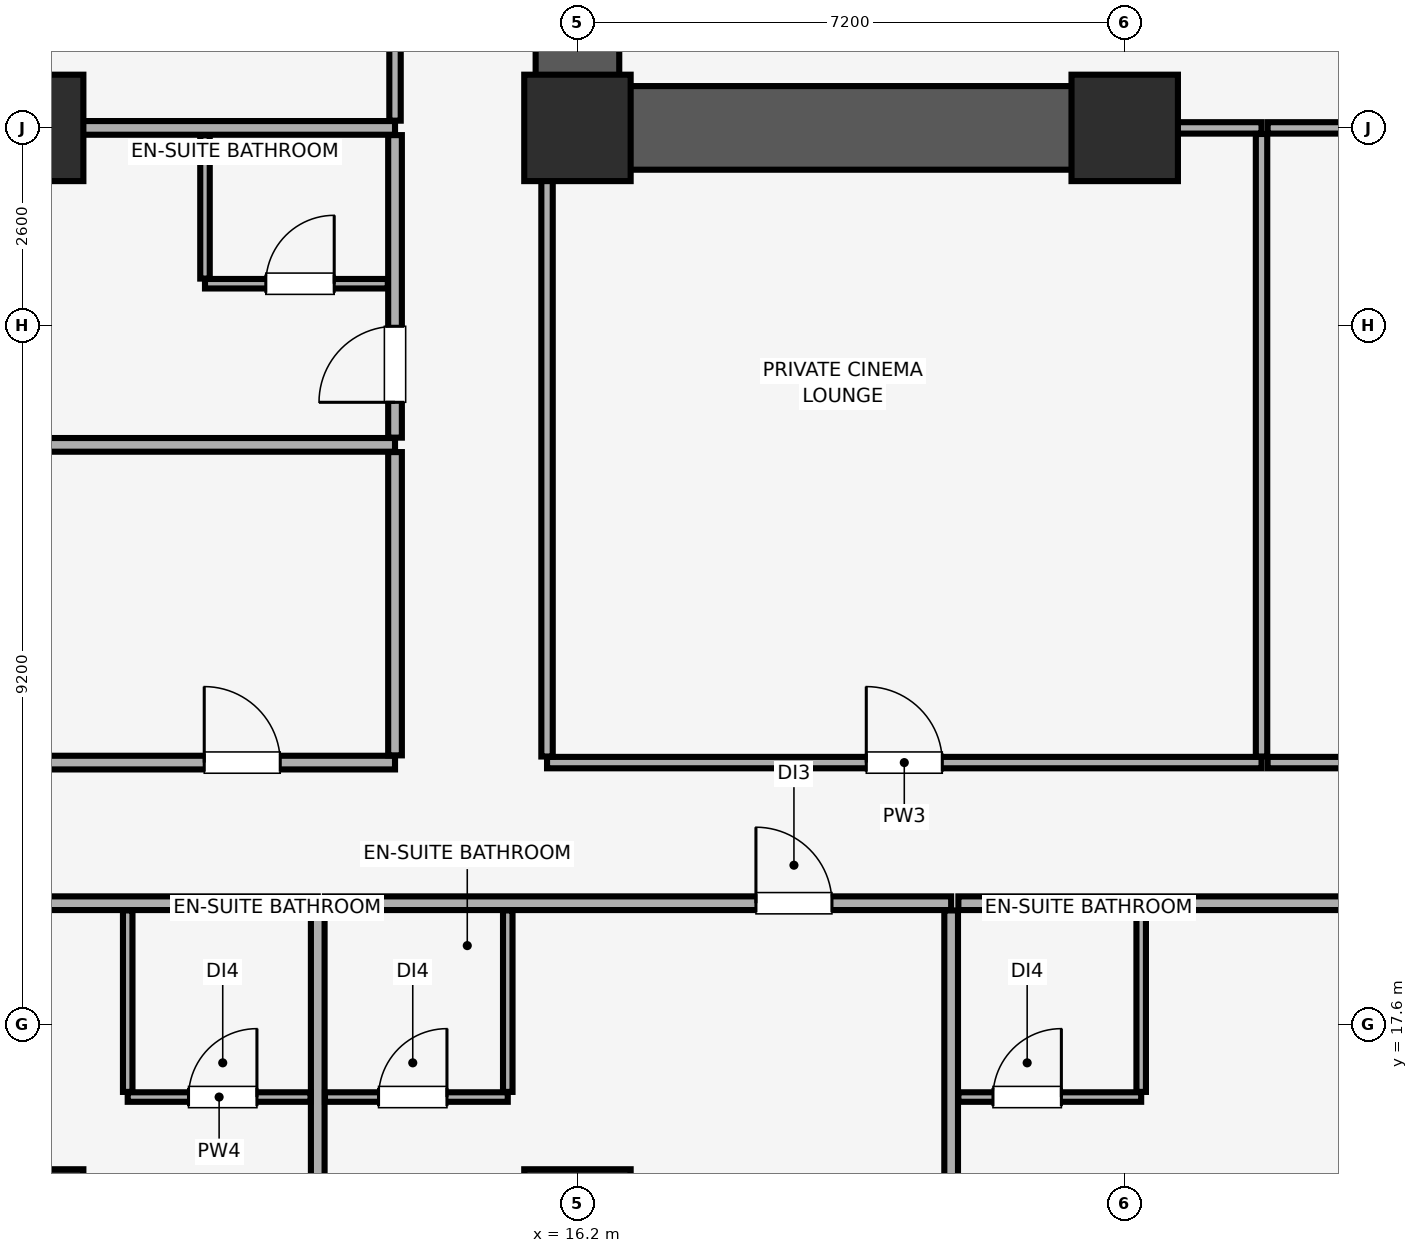
"""IFC4 building model, lengths in metres.
Left out: names, types, materials, properties, quantities, classifications, styles, units other than length and angle.
Written with IfcOpenShell. Run it as: python <this file> out.ifc"""

import sys

from ifc_helpers import new_model, si_unit, direction, frame, frame_2d, origin, origin_2d, place, context, subcontext, project, spatial, rectangle, extrude, element, fill, save


model = new_model("IFC4")
c1 = context("Model", 3, precision=1e-05, world=origin(), true_north=direction((0.0, 1.0)))
c2 = subcontext(c1, "Body", "Model", "MODEL_VIEW")
j1 = project(units=[si_unit("LENGTHUNIT", "METRE"), si_unit("PLANEANGLEUNIT", "RADIAN")], contexts=[c1])
p1 = place(None, origin())
s1 = spatial("IfcSite", under=j1, at=p1, CompositionType="ELEMENT")
p2 = place(p1, origin())
s2 = spatial("IfcBuilding", under=s1, at=p2, CompositionType="ELEMENT")
p3 = place(p2, frame((0.0, 0.0, 76.4)))
s3 = spatial("IfcBuildingStorey", under=s2, at=p3, CompositionType="ELEMENT", Elevation=76.4)
for number, where, z_axis, x_axis in (
    (1, (9.0, 15.0, 0.0), (0.0, 0.0, 1.0), (1.0, 0.0, 0.0)),
    (2, (16.2, 15.0, 0.0), (0.0, 0.0, 1.0), (1.0, 0.0, 0.0)),
    (3, (9.0, 29.4, 0.0), (0.0, 0.0, 1.0), (1.0, 0.0, 0.0)),
    (4, (16.2, 29.4, 0.0), (0.0, 0.0, 1.0), (1.0, 0.0, 0.0)),
    (5, (23.4, 29.4, 0.0), (0.0, 0.0, 1.0), (1.0, 0.0, 0.0)),
):
    element("IfcColumn", number, at=place(p3, frame(where, z_axis=z_axis, x_axis=x_axis)), inside=s3, PredefinedType="COLUMN", context=c2, shape_type="SweptSolid", body=[
        extrude(rectangle(XDim=1.4, YDim=1.4, at=origin_2d()), origin(), (0.0, 0.0, 1.0), 3.4),
    ])
p4 = place(p3, frame((16.2, 29.4, 0.0), z_axis=(0.0, 0.0, 1.0), x_axis=(0.0, 1.0, 0.0)))
e6 = element("IfcWall", 6, at=p4, inside=s3, PredefinedType="SHEAR", context=c2, shape_type="SweptSolid", body=[
    extrude(rectangle(XDim=19.2, YDim=1.1, at=frame_2d((9.6, 0.0))), origin(), (0.0, 0.0, 1.0), 3.4),
])
p5 = place(p3, frame((16.755, 29.4, 0.0), z_axis=(0.0, 0.0, 1.0), x_axis=(1.0, 0.0, 0.0)))
e7 = element("IfcWall", 7, at=p5, inside=s3, PredefinedType="SHEAR", context=c2, shape_type="SweptSolid", body=[
    extrude(rectangle(XDim=6.845, YDim=1.1, at=frame_2d((3.423, 0.0))), origin(), (0.0, 0.0, 1.0), 3.4),
])
p6 = place(p3, frame((0.15, 19.2, 0.0), z_axis=(0.0, 0.0, 1.0), x_axis=(1.0, 0.0, 0.0)))
e8 = element("IfcWall", 8, at=p6, inside=s3, PredefinedType="PARTITIONING", context=c2, shape_type="SweptSolid", body=[
    extrude(rectangle(XDim=12.633, YDim=0.18, at=frame_2d((6.317, 0.0))), origin(), (0.0, 0.0, 1.0), 3.4),
])
p7 = place(p6, frame((5.685, 0.0, 0.0)))
e9 = element("IfcOpeningElement", 9, at=p7, cuts=e8, PredefinedType="OPENING", context=c2, shape_type="SweptSolid", body=[
    extrude(rectangle(XDim=1.0, YDim=2.15, at=frame_2d((0.5, 1.075))), frame((0.0, 0.1, 0.0), z_axis=(0.0, -1.0, 0.0), x_axis=(1.0, 0.0, 0.0)), (0.0, 0.0, 1.0), 0.2),
])
p8 = place(p3, frame((12.783, 0.15, 0.0), z_axis=(0.0, 0.0, 1.0), x_axis=(0.0, 1.0, 0.0)))
e10 = element("IfcWall", 10, at=p8, inside=s3, PredefinedType="PARTITIONING", context=c2, shape_type="SweptSolid", body=[
    extrude(rectangle(XDim=18.955, YDim=0.18, at=frame_2d((9.478, 0.0))), origin(), (0.0, 0.0, 1.0), 2.8),
])
p9 = place(p3, frame((10.283, 16.65, 0.0), z_axis=(0.0, 0.0, 1.0), x_axis=(1.0, 0.0, 0.0)))
e11 = element("IfcWall", 11, at=p9, inside=s3, PredefinedType="PARTITIONING", context=c2, shape_type="SweptSolid", body=[
    extrude(rectangle(XDim=2.405, YDim=0.125, at=frame_2d((1.203, 0.0))), origin(), (0.0, 0.0, 1.0), 3.4),
])
p10 = place(p9, frame((0.8, 0.0, 0.0)))
e12 = element("IfcOpeningElement", 12, at=p10, cuts=e11, PredefinedType="OPENING", context=c2, shape_type="SweptSolid", body=[
    extrude(rectangle(XDim=0.9, YDim=2.1, at=frame_2d((0.45, 1.05))), frame((0.0, 0.073, 0.0), z_axis=(0.0, -1.0, 0.0), x_axis=(1.0, 0.0, 0.0)), (0.0, 0.0, 1.0), 0.145),
])
p11 = place(p3, frame((10.283, 16.718, 0.0), z_axis=(0.0, 0.0, 1.0), x_axis=(0.0, 1.0, 0.0)))
e13 = element("IfcWall", 13, at=p11, inside=s3, PredefinedType="PARTITIONING", context=c2, shape_type="SweptSolid", body=[
    extrude(rectangle(XDim=2.387, YDim=0.125, at=frame_2d((1.194, 0.0))), origin(), (0.0, 0.0, 1.0), 3.4),
])
p12 = place(p3, frame((12.878, 19.2, 0.0), z_axis=(0.0, 0.0, 1.0), x_axis=(1.0, 0.0, 0.0)))
e14 = element("IfcWall", 14, at=p12, inside=s3, PredefinedType="PARTITIONING", context=c2, shape_type="SweptSolid", body=[
    extrude(rectangle(XDim=8.238, YDim=0.18, at=frame_2d((4.119, 0.0))), origin(), (0.0, 0.0, 1.0), 3.4),
])
p13 = place(p12, frame((5.67, 0.0, 0.0)))
e15 = element("IfcOpeningElement", 15, at=p13, cuts=e14, PredefinedType="OPENING", context=c2, shape_type="SweptSolid", body=[
    extrude(rectangle(XDim=1.0, YDim=2.15, at=frame_2d((0.5, 1.075))), frame((0.0, 0.1, 0.0), z_axis=(0.0, -1.0, 0.0), x_axis=(1.0, 0.0, 0.0)), (0.0, 0.0, 1.0), 0.2),
])
p14 = place(p3, frame((21.117, 0.15, 0.0), z_axis=(0.0, 0.0, 1.0), x_axis=(0.0, 1.0, 0.0)))
e16 = element("IfcWall", 16, at=p14, inside=s3, PredefinedType="PARTITIONING", context=c2, shape_type="SweptSolid", body=[
    extrude(rectangle(XDim=18.955, YDim=0.18, at=frame_2d((9.478, 0.0))), origin(), (0.0, 0.0, 1.0), 3.4),
])
p15 = place(p3, frame((12.878, 16.65, 0.0), z_axis=(0.0, 0.0, 1.0), x_axis=(1.0, 0.0, 0.0)))
e17 = element("IfcWall", 17, at=p15, inside=s3, PredefinedType="PARTITIONING", context=c2, shape_type="SweptSolid", body=[
    extrude(rectangle(XDim=2.405, YDim=0.125, at=frame_2d((1.202, 0.0))), origin(), (0.0, 0.0, 1.0), 3.4),
])
p16 = place(p15, frame((0.705, 0.0, 0.0)))
e18 = element("IfcOpeningElement", 18, at=p16, cuts=e17, PredefinedType="OPENING", context=c2, shape_type="SweptSolid", body=[
    extrude(rectangle(XDim=0.9, YDim=2.1, at=frame_2d((0.45, 1.05))), frame((0.0, 0.073, 0.0), z_axis=(0.0, -1.0, 0.0), x_axis=(1.0, 0.0, 0.0)), (0.0, 0.0, 1.0), 0.145),
])
p17 = place(p3, frame((15.283, 16.718, 0.0), z_axis=(0.0, 0.0, 1.0), x_axis=(0.0, 1.0, 0.0)))
e19 = element("IfcWall", 19, at=p17, inside=s3, PredefinedType="PARTITIONING", context=c2, shape_type="SweptSolid", body=[
    extrude(rectangle(XDim=2.387, YDim=0.125, at=frame_2d((1.194, 0.0))), origin(), (0.0, 0.0, 1.0), 3.4),
])
p18 = place(p3, frame((21.212, 19.2, 0.0), z_axis=(0.0, 0.0, 1.0), x_axis=(1.0, 0.0, 0.0)))
e20 = element("IfcWall", 20, at=p18, inside=s3, PredefinedType="PARTITIONING", context=c2, shape_type="SweptSolid", body=[
    extrude(rectangle(XDim=8.238, YDim=0.18, at=frame_2d((4.119, 0.0))), origin(), (0.0, 0.0, 1.0), 3.4),
])
p19 = place(p18, frame((5.271, 0.0, 0.0)))
e21 = element("IfcOpeningElement", 21, at=p19, cuts=e20, PredefinedType="OPENING", context=c2, shape_type="SweptSolid", body=[
    extrude(rectangle(XDim=1.0, YDim=2.15, at=frame_2d((0.5, 1.075))), frame((0.0, 0.1, 0.0), z_axis=(0.0, -1.0, 0.0), x_axis=(1.0, 0.0, 0.0)), (0.0, 0.0, 1.0), 0.2),
])
p20 = place(p3, frame((21.212, 16.65, 0.0), z_axis=(0.0, 0.0, 1.0), x_axis=(1.0, 0.0, 0.0)))
e22 = element("IfcWall", 22, at=p20, inside=s3, PredefinedType="PARTITIONING", context=c2, shape_type="SweptSolid", body=[
    extrude(rectangle(XDim=2.405, YDim=0.125, at=frame_2d((1.203, 0.0))), origin(), (0.0, 0.0, 1.0), 3.4),
])
p21 = place(p20, frame((0.455, 0.0, 0.0)))
e23 = element("IfcOpeningElement", 23, at=p21, cuts=e22, PredefinedType="OPENING", context=c2, shape_type="SweptSolid", body=[
    extrude(rectangle(XDim=0.9, YDim=2.1, at=frame_2d((0.45, 1.05))), frame((0.0, 0.073, 0.0), z_axis=(0.0, -1.0, 0.0), x_axis=(1.0, 0.0, 0.0)), (0.0, 0.0, 1.0), 0.145),
])
p22 = place(p3, frame((23.617, 16.718, 0.0), z_axis=(0.0, 0.0, 1.0), x_axis=(0.0, 1.0, 0.0)))
e24 = element("IfcWall", 24, at=p22, inside=s3, PredefinedType="PARTITIONING", context=c2, shape_type="SweptSolid", body=[
    extrude(rectangle(XDim=2.387, YDim=0.125, at=frame_2d((1.194, 0.0))), origin(), (0.0, 0.0, 1.0), 2.9),
])
p23 = place(p3, frame((15.8, 21.05, 0.0), z_axis=(0.0, 0.0, 1.0), x_axis=(1.0, 0.0, 0.0)))
e25 = element("IfcWall", 25, at=p23, inside=s3, PredefinedType="PARTITIONING", context=c2, shape_type="SweptSolid", body=[
    extrude(rectangle(XDim=9.4, YDim=0.15, at=frame_2d((4.7, 0.0))), origin(), (0.0, 0.0, 1.0), 3.4),
])
p24 = place(p23, frame((4.2, 0.0, 0.0)))
e26 = element("IfcOpeningElement", 26, at=p24, cuts=e25, PredefinedType="OPENING", context=c2, shape_type="SweptSolid", body=[
    extrude(rectangle(XDim=1.0, YDim=2.15, at=frame_2d((0.5, 1.075))), frame((0.0, 0.085, 0.0), z_axis=(0.0, -1.0, 0.0), x_axis=(1.0, 0.0, 0.0)), (0.0, 0.0, 1.0), 0.17),
])
p25 = place(p3, frame((23.61, 29.4, 0.0), z_axis=(0.0, 0.0, 1.0), x_axis=(1.0, 0.0, 0.0)))
e27 = element("IfcWall", 27, at=p25, inside=s3, PredefinedType="PARTITIONING", context=c2, shape_type="SweptSolid", body=[
    extrude(rectangle(XDim=1.59, YDim=0.15, at=frame_2d((0.795, 0.0))), origin(), (0.0, 0.0, 1.0), 2.3),
])
p26 = place(p3, frame((15.8, 21.13, 0.0), z_axis=(0.0, 0.0, 1.0), x_axis=(0.0, 1.0, 0.0)))
e28 = element("IfcWall", 28, at=p26, inside=s3, PredefinedType="PARTITIONING", context=c2, shape_type="SweptSolid", body=[
    extrude(rectangle(XDim=8.26, YDim=0.15, at=frame_2d((4.13, 0.0))), origin(), (0.0, 0.0, 1.0), 3.4),
])
p27 = place(p3, frame((25.2, 21.13, 0.0), z_axis=(0.0, 0.0, 1.0), x_axis=(0.0, 1.0, 0.0)))
e29 = element("IfcWall", 29, at=p27, inside=s3, PredefinedType="PARTITIONING", context=c2, shape_type="SweptSolid", body=[
    extrude(rectangle(XDim=8.19, YDim=0.15, at=frame_2d((4.095, 0.0))), origin(), (0.0, 0.0, 1.0), 3.4),
])
p28 = place(p3, frame((25.28, 21.05, 0.0), z_axis=(0.0, 0.0, 1.0), x_axis=(1.0, 0.0, 0.0)))
e30 = element("IfcWall", 30, at=p28, inside=s3, PredefinedType="PARTITIONING", context=c2, shape_type="SweptSolid", body=[
    extrude(rectangle(XDim=14.52, YDim=0.15, at=frame_2d((7.26, 0.0))), origin(), (0.0, 0.0, 1.0), 3.4),
])
p29 = place(p28, frame((6.72, 0.0, 0.0)))
e31 = element("IfcOpeningElement", 31, at=p29, cuts=e30, PredefinedType="OPENING", context=c2, shape_type="SweptSolid", body=[
    extrude(rectangle(XDim=1.0, YDim=2.15, at=frame_2d((0.5, 1.075))), frame((0.0, 0.085, 0.0), z_axis=(0.0, -1.0, 0.0), x_axis=(1.0, 0.0, 0.0)), (0.0, 0.0, 1.0), 0.17),
])
p30 = place(p3, frame((25.28, 29.4, 0.0), z_axis=(0.0, 0.0, 1.0), x_axis=(1.0, 0.0, 0.0)))
e32 = element("IfcWall", 32, at=p30, inside=s3, PredefinedType="PARTITIONING", context=c2, shape_type="SweptSolid", body=[
    extrude(rectangle(XDim=5.11, YDim=0.15, at=frame_2d((2.555, 0.0))), origin(), (0.0, 0.0, 1.0), 2.3),
])
p31 = place(p3, frame((0.15, 21.05, 0.0), z_axis=(0.0, 0.0, 1.0), x_axis=(1.0, 0.0, 0.0)))
e33 = element("IfcWall", 33, at=p31, inside=s3, PredefinedType="PARTITIONING", context=c2, shape_type="SweptSolid", body=[
    extrude(rectangle(XDim=13.65, YDim=0.18, at=frame_2d((6.825, 0.0))), origin(), (0.0, 0.0, 1.0), 3.4),
])
p32 = place(p31, frame((11.14, 0.0, 0.0)))
e34 = element("IfcOpeningElement", 34, at=p32, cuts=e33, PredefinedType="OPENING", context=c2, shape_type="SweptSolid", body=[
    extrude(rectangle(XDim=1.0, YDim=2.15, at=frame_2d((0.5, 1.075))), frame((0.0, 0.1, 0.0), z_axis=(0.0, -1.0, 0.0), x_axis=(1.0, 0.0, 0.0)), (0.0, 0.0, 1.0), 0.2),
])
p33 = place(p3, frame((0.15, 25.23, 0.0), z_axis=(0.0, 0.0, 1.0), x_axis=(1.0, 0.0, 0.0)))
e35 = element("IfcWall", 35, at=p33, inside=s3, PredefinedType="PARTITIONING", context=c2, shape_type="SweptSolid", body=[
    extrude(rectangle(XDim=13.65, YDim=0.18, at=frame_2d((6.825, 0.0))), origin(), (0.0, 0.0, 1.0), 3.4),
])
p34 = place(p3, frame((13.8, 21.145, 0.0), z_axis=(0.0, 0.0, 1.0), x_axis=(0.0, 1.0, 0.0)))
e36 = element("IfcWall", 36, at=p34, inside=s3, PredefinedType="PARTITIONING", context=c2, shape_type="SweptSolid", body=[
    extrude(rectangle(XDim=3.99, YDim=0.18, at=frame_2d((1.995, 0.0))), origin(), (0.0, 0.0, 1.0), 3.4),
])
p35 = place(p3, frame((0.15, 29.4, 0.0), z_axis=(0.0, 0.0, 1.0), x_axis=(1.0, 0.0, 0.0)))
e37 = element("IfcWall", 37, at=p35, inside=s3, PredefinedType="PARTITIONING", context=c2, shape_type="SweptSolid", body=[
    extrude(rectangle(XDim=13.65, YDim=0.18, at=frame_2d((6.825, 0.0))), origin(), (0.0, 0.0, 1.0), 2.49),
])
p36 = place(p3, frame((13.8, 25.325, 0.0), z_axis=(0.0, 0.0, 1.0), x_axis=(0.0, 1.0, 0.0)))
e38 = element("IfcWall", 38, at=p36, inside=s3, PredefinedType="PARTITIONING", context=c2, shape_type="SweptSolid", body=[
    extrude(rectangle(XDim=3.98, YDim=0.18, at=frame_2d((1.99, 0.0))), origin(), (0.0, 0.0, 1.0), 3.4),
])
p37 = place(p36, frame((0.465, 0.0, 0.0)))
e39 = element("IfcOpeningElement", 39, at=p37, cuts=e38, PredefinedType="OPENING", context=c2, shape_type="SweptSolid", body=[
    extrude(rectangle(XDim=1.0, YDim=2.15, at=frame_2d((0.5, 1.075))), frame((0.0, 0.1, 0.0), z_axis=(0.0, -1.0, 0.0), x_axis=(1.0, 0.0, 0.0)), (0.0, 0.0, 1.0), 0.2),
])
p38 = place(p3, frame((11.3, 27.35, 0.0), z_axis=(0.0, 0.0, 1.0), x_axis=(1.0, 0.0, 0.0)))
e40 = element("IfcWall", 40, at=p38, inside=s3, PredefinedType="PARTITIONING", context=c2, shape_type="SweptSolid", body=[
    extrude(rectangle(XDim=2.405, YDim=0.125, at=frame_2d((1.203, 0.0))), origin(), (0.0, 0.0, 1.0), 3.4),
])
p39 = place(p38, frame((0.8, 0.0, 0.0)))
e41 = element("IfcOpeningElement", 41, at=p39, cuts=e40, PredefinedType="OPENING", context=c2, shape_type="SweptSolid", body=[
    extrude(rectangle(XDim=0.9, YDim=2.1, at=frame_2d((0.45, 1.05))), frame((0.0, 0.073, 0.0), z_axis=(0.0, -1.0, 0.0), x_axis=(1.0, 0.0, 0.0)), (0.0, 0.0, 1.0), 0.145),
])
p40 = place(p3, frame((11.3, 27.417, 0.0), z_axis=(0.0, 0.0, 1.0), x_axis=(0.0, 1.0, 0.0)))
e42 = element("IfcWall", 42, at=p40, inside=s3, PredefinedType="PARTITIONING", context=c2, shape_type="SweptSolid", body=[
    extrude(rectangle(XDim=1.887, YDim=0.125, at=frame_2d((0.944, 0.0))), origin(), (0.0, 0.0, 1.0), 3.4),
])
p41 = place(p3, frame((13.8, 29.495, 0.0), z_axis=(0.0, 0.0, 1.0), x_axis=(0.0, 1.0, 0.0)))
e43 = element("IfcWall", 43, at=p41, inside=s3, PredefinedType="PARTITIONING", context=c2, shape_type="SweptSolid", body=[
    extrude(rectangle(XDim=6.625, YDim=0.15, at=frame_2d((3.312, 0.0))), origin(), (0.0, 0.0, 1.0), 3.4),
])
p42 = place(p41, frame((2.805, 0.0, 0.0)))
e44 = element("IfcOpeningElement", 44, at=p42, cuts=e43, PredefinedType="OPENING", context=c2, shape_type="SweptSolid", body=[
    extrude(rectangle(XDim=1.0, YDim=2.15, at=frame_2d((0.5, 1.075))), frame((0.0, 0.085, 0.0), z_axis=(0.0, -1.0, 0.0), x_axis=(1.0, 0.0, 0.0)), (0.0, 0.0, 1.0), 0.17),
])
p43 = place(p10, origin())
e45 = element("IfcDoor", 45, at=p43, inside=s3, OperationType="SINGLE_SWING_RIGHT", PredefinedType="DOOR", context=c2, shape_type="SweptSolid", body=[
    extrude(rectangle(XDim=0.9, YDim=2.1, at=frame_2d((0.45, 1.05))), frame((0.0, 0.025, 0.0), z_axis=(0.0, -1.0, 0.0), x_axis=(1.0, 0.0, 0.0)), (0.0, 0.0, 1.0), 0.05),
])
fill(e12, e45)
p44 = place(p13, origin())
e46 = element("IfcDoor", 46, at=p44, inside=s3, OperationType="SINGLE_SWING_LEFT", PredefinedType="DOOR", context=c2, shape_type="SweptSolid", body=[
    extrude(rectangle(XDim=1.0, YDim=2.15, at=frame_2d((0.5, 1.075))), frame((0.0, 0.025, 0.0), z_axis=(0.0, -1.0, 0.0), x_axis=(1.0, 0.0, 0.0)), (0.0, 0.0, 1.0), 0.05),
])
fill(e15, e46)
p45 = place(p16, origin())
e47 = element("IfcDoor", 47, at=p45, inside=s3, OperationType="SINGLE_SWING_RIGHT", PredefinedType="DOOR", context=c2, shape_type="SweptSolid", body=[
    extrude(rectangle(XDim=0.9, YDim=2.1, at=frame_2d((0.45, 1.05))), frame((0.0, 0.025, 0.0), z_axis=(0.0, -1.0, 0.0), x_axis=(1.0, 0.0, 0.0)), (0.0, 0.0, 1.0), 0.05),
])
fill(e18, e47)
p46 = place(p21, origin())
e48 = element("IfcDoor", 48, at=p46, inside=s3, OperationType="SINGLE_SWING_RIGHT", PredefinedType="DOOR", context=c2, shape_type="SweptSolid", body=[
    extrude(rectangle(XDim=0.9, YDim=2.1, at=frame_2d((0.45, 1.05))), frame((0.0, 0.025, 0.0), z_axis=(0.0, -1.0, 0.0), x_axis=(1.0, 0.0, 0.0)), (0.0, 0.0, 1.0), 0.05),
])
fill(e23, e48)
p47 = place(p24, origin())
e49 = element("IfcDoor", 49, at=p47, inside=s3, OperationType="SINGLE_SWING_LEFT", PredefinedType="DOOR", context=c2, shape_type="SweptSolid", body=[
    extrude(rectangle(XDim=1.0, YDim=2.15, at=frame_2d((0.5, 1.075))), frame((0.0, 0.025, 0.0), z_axis=(0.0, -1.0, 0.0), x_axis=(1.0, 0.0, 0.0)), (0.0, 0.0, 1.0), 0.05),
])
fill(e26, e49)
p48 = place(p32, origin())
e50 = element("IfcDoor", 50, at=p48, inside=s3, OperationType="SINGLE_SWING_LEFT", PredefinedType="DOOR", context=c2, shape_type="SweptSolid", body=[
    extrude(rectangle(XDim=1.0, YDim=2.15, at=frame_2d((0.5, 1.075))), frame((0.0, 0.025, 0.0), z_axis=(0.0, -1.0, 0.0), x_axis=(1.0, 0.0, 0.0)), (0.0, 0.0, 1.0), 0.05),
])
fill(e34, e50)
p49 = place(p37, origin())
e51 = element("IfcDoor", 51, at=p49, inside=s3, OperationType="SINGLE_SWING_LEFT", PredefinedType="DOOR", context=c2, shape_type="SweptSolid", body=[
    extrude(rectangle(XDim=1.0, YDim=2.15, at=frame_2d((0.5, 1.075))), frame((0.0, 0.025, 0.0), z_axis=(0.0, -1.0, 0.0), x_axis=(1.0, 0.0, 0.0)), (0.0, 0.0, 1.0), 0.05),
])
fill(e39, e51)
p50 = place(p39, origin())
e52 = element("IfcDoor", 52, at=p50, inside=s3, OperationType="SINGLE_SWING_RIGHT", PredefinedType="DOOR", context=c2, shape_type="SweptSolid", body=[
    extrude(rectangle(XDim=0.9, YDim=2.1, at=frame_2d((0.45, 1.05))), frame((0.0, 0.025, 0.0), z_axis=(0.0, -1.0, 0.0), x_axis=(1.0, 0.0, 0.0)), (0.0, 0.0, 1.0), 0.05),
])
fill(e41, e52)
save(model, sys.argv[1])
